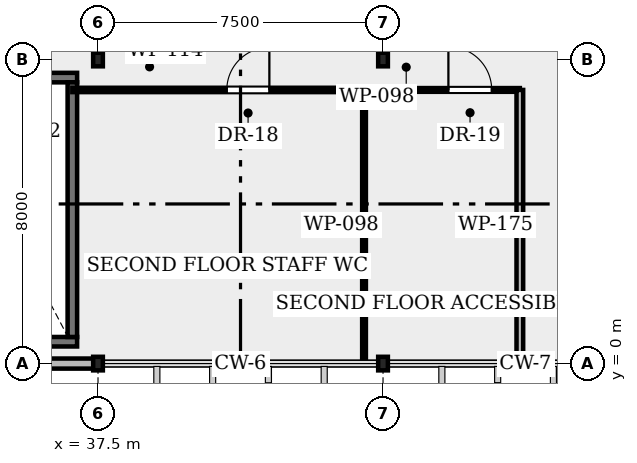
"""IFC4 building model, lengths in metres.
Left out: names, types, materials, properties, quantities, classifications, styles, units other than length and angle.
Written with IfcOpenShell. Run it as: python <this file> out.ifc"""

import sys

from ifc_helpers import new_model, si_unit, direction, frame, frame_2d, origin, origin_2d, place, context, subcontext, project, spatial, rectangle, i_section, extrude, element, fill, save


model = new_model("IFC4")
c1 = context("Model", 3, precision=1e-05, world=origin(), true_north=direction((0.0, 1.0)))
c2 = subcontext(c1, "Body", "Model", "MODEL_VIEW")
j1 = project(units=[si_unit("LENGTHUNIT", "METRE"), si_unit("PLANEANGLEUNIT", "RADIAN")], contexts=[c1])
p1 = place(None, origin())
s1 = spatial("IfcSite", under=j1, at=p1, CompositionType="ELEMENT")
p2 = place(p1, origin())
s2 = spatial("IfcBuilding", under=s1, at=p2, CompositionType="ELEMENT")
p3 = place(p2, frame((0.0, 0.0, 9.0)))
s3 = spatial("IfcBuildingStorey", under=s2, at=p3, CompositionType="ELEMENT", Elevation=9.0)
p4 = place(p3, frame((37.5, 0.0, 0.0), z_axis=(0.0, 0.0, 1.0), x_axis=(1.0, 0.0, 0.0)))
e1 = element("IfcColumn", 1, at=p4, inside=s3, PredefinedType="COLUMN", context=c2, shape_type="SweptSolid", body=[
    extrude(i_section(OverallWidth=0.255, OverallDepth=0.357, WebThickness=0.01, FlangeThickness=0.018, FilletRadius=0.015, at=origin_2d()), origin(), (0.0, 0.0, 1.0), 4.46),
])
p5 = place(p3, frame((37.5, 8.0, 0.0), z_axis=(0.0, 0.0, 1.0), x_axis=(1.0, 0.0, 0.0)))
e2 = element("IfcColumn", 2, at=p5, inside=s3, PredefinedType="COLUMN", context=c2, shape_type="SweptSolid", body=[
    extrude(i_section(OverallWidth=0.255, OverallDepth=0.357, WebThickness=0.01, FlangeThickness=0.018, FilletRadius=0.015, at=origin_2d()), origin(), (0.0, 0.0, 1.0), 4.927),
])
p6 = place(p3, frame((45.0, 0.0, 0.0), z_axis=(0.0, 0.0, 1.0), x_axis=(1.0, 0.0, 0.0)))
e3 = element("IfcColumn", 3, at=p6, inside=s3, PredefinedType="COLUMN", context=c2, shape_type="SweptSolid", body=[
    extrude(i_section(OverallWidth=0.255, OverallDepth=0.357, WebThickness=0.01, FlangeThickness=0.018, FilletRadius=0.015, at=origin_2d()), origin(), (0.0, 0.0, 1.0), 4.46),
])
p7 = place(p3, frame((45.0, 8.0, 0.0), z_axis=(0.0, 0.0, 1.0), x_axis=(1.0, 0.0, 0.0)))
e4 = element("IfcColumn", 4, at=p7, inside=s3, PredefinedType="COLUMN", context=c2, shape_type="SweptSolid", body=[
    extrude(i_section(OverallWidth=0.255, OverallDepth=0.357, WebThickness=0.01, FlangeThickness=0.018, FilletRadius=0.015, at=origin_2d()), origin(), (0.0, 0.0, 1.0), 4.927),
])
p8 = place(p3, frame((30.08, 0.0, 0.0), z_axis=(0.0, 0.0, 1.0), x_axis=(1.0, 0.0, 0.0)))
e5 = element("IfcWall", 5, at=p8, inside=s3, PredefinedType="SOLIDWALL", context=c2, shape_type="SweptSolid", body=[
    extrude(rectangle(XDim=7.34, YDim=0.265, at=frame_2d((3.67, 0.0))), origin(), (0.0, 0.0, 1.0), 4.087),
])
p9 = place(p8, frame((1.2, 0.0, 1.05)))
e6 = element("IfcOpeningElement", 6, at=p9, cuts=e5, PredefinedType="OPENING", context=c2, shape_type="SweptSolid", body=[
    extrude(rectangle(XDim=1.8, YDim=1.1, at=frame_2d((0.9, 0.55))), frame((0.0, 0.142, 0.0), z_axis=(0.0, -1.0, 0.0), x_axis=(1.0, 0.0, 0.0)), (0.0, 0.0, 1.0), 0.285),
])
p10 = place(p8, frame((4.1, 0.0, 1.05)))
e7 = element("IfcOpeningElement", 7, at=p10, cuts=e5, PredefinedType="OPENING", context=c2, shape_type="SweptSolid", body=[
    extrude(rectangle(XDim=1.8, YDim=1.25, at=frame_2d((0.9, 0.625))), frame((0.0, 0.142, 0.0), z_axis=(0.0, -1.0, 0.0), x_axis=(1.0, 0.0, 0.0)), (0.0, 0.0, 1.0), 0.285),
])
p11 = place(p3, frame((30.55, 0.575, 0.0), z_axis=(0.0, 0.0, 1.0), x_axis=(1.0, 0.0, 0.0)))
e8 = element("IfcWall", 8, at=p11, inside=s3, PredefinedType="SHEAR", context=c2, shape_type="SweptSolid", body=[
    extrude(rectangle(XDim=6.4, YDim=0.25, at=frame_2d((3.2, 0.0))), origin(), (0.0, 0.0, 1.0), 3.65),
])
p12 = place(p3, frame((30.55, 7.525, 0.0), z_axis=(0.0, 0.0, 1.0), x_axis=(1.0, 0.0, 0.0)))
e9 = element("IfcWall", 9, at=p12, inside=s3, PredefinedType="SHEAR", context=c2, shape_type="SweptSolid", body=[
    extrude(rectangle(XDim=6.4, YDim=0.25, at=frame_2d((3.2, 0.0))), origin(), (0.0, 0.0, 1.0), 3.65),
])
p13 = place(p12, frame((0.8, 0.0, 0.0)))
e10 = element("IfcOpeningElement", 10, at=p13, cuts=e9, PredefinedType="OPENING", context=c2, shape_type="SweptSolid", body=[
    extrude(rectangle(XDim=1.1, YDim=2.15, at=frame_2d((0.55, 1.075))), frame((0.0, 0.135, 0.0), z_axis=(0.0, -1.0, 0.0), x_axis=(1.0, 0.0, 0.0)), (0.0, 0.0, 1.0), 0.27),
])
p14 = place(p12, frame((3.775, 0.0, 0.0)))
e11 = element("IfcOpeningElement", 11, at=p14, cuts=e9, PredefinedType="OPENING", context=c2, shape_type="SweptSolid", body=[
    extrude(rectangle(XDim=1.25, YDim=2.15, at=frame_2d((0.625, 1.075))), frame((0.0, 0.135, 0.0), z_axis=(0.0, -1.0, 0.0), x_axis=(1.0, 0.0, 0.0)), (0.0, 0.0, 1.0), 0.27),
])
p15 = place(p3, frame((36.825, 0.7, 0.0), z_axis=(0.0, 0.0, 1.0), x_axis=(0.0, 1.0, 0.0)))
e12 = element("IfcWall", 12, at=p15, inside=s3, PredefinedType="SHEAR", context=c2, shape_type="SweptSolid", body=[
    extrude(rectangle(XDim=6.7, YDim=0.25, at=frame_2d((3.35, 0.0))), origin(), (0.0, 0.0, 1.0), 3.65),
])
p16 = place(p3, frame((36.825, 7.2, 0.0), z_axis=(0.0, 0.0, 1.0), x_axis=(1.0, 0.0, 0.0)))
e13 = element("IfcWall", 13, at=p16, inside=s3, PredefinedType="PARTITIONING", context=c2, shape_type="SweptSolid", body=[
    extrude(rectangle(XDim=7.675, YDim=0.114, at=frame_2d((3.837, 0.0))), origin(), (0.0, 0.0, 1.0), 3.7),
])
p17 = place(p16, frame((4.064, 0.0, 0.0)))
e14 = element("IfcOpeningElement", 14, at=p17, cuts=e13, PredefinedType="OPENING", context=c2, shape_type="SweptSolid", body=[
    extrude(rectangle(XDim=1.12, YDim=2.14, at=frame_2d((0.56, 1.07))), frame((0.0, 0.067, 0.0), z_axis=(0.0, -1.0, 0.0), x_axis=(1.0, 0.0, 0.0)), (0.0, 0.0, 1.0), 0.134),
])
p18 = place(p3, frame((44.5, 0.08, 0.0), z_axis=(0.0, 0.0, 1.0), x_axis=(0.0, 1.0, 0.0)))
e15 = element("IfcWall", 15, at=p18, inside=s3, PredefinedType="PARTITIONING", context=c2, shape_type="SweptSolid", body=[
    extrude(rectangle(XDim=7.12, YDim=0.098, at=frame_2d((3.56, 0.0))), origin(), (0.0, 0.0, 1.0), 3.7),
])
p19 = place(p3, frame((44.5, 7.2, 0.0), z_axis=(0.0, 0.0, 1.0), x_axis=(1.0, 0.0, 0.0)))
e16 = element("IfcWall", 16, at=p19, inside=s3, PredefinedType="PARTITIONING", context=c2, shape_type="SweptSolid", body=[
    extrude(rectangle(XDim=4.1, YDim=0.098, at=frame_2d((2.05, 0.0))), origin(), (0.0, 0.0, 1.0), 3.7),
])
p20 = place(p19, frame((2.22, 0.0, 0.0)))
e17 = element("IfcOpeningElement", 17, at=p20, cuts=e16, PredefinedType="OPENING", context=c2, shape_type="SweptSolid", body=[
    extrude(rectangle(XDim=1.14, YDim=2.16, at=frame_2d((0.57, 1.08))), frame((0.0, 0.059, 0.0), z_axis=(0.0, -1.0, 0.0), x_axis=(1.0, 0.0, 0.0)), (0.0, 0.0, 1.0), 0.118),
])
p21 = place(p3, frame((48.6, 0.08, 0.0), z_axis=(0.0, 0.0, 1.0), x_axis=(0.0, 1.0, 0.0)))
e18 = element("IfcWall", 18, at=p21, inside=s3, PredefinedType="PARTITIONING", context=c2, shape_type="SweptSolid", body=[
    extrude(rectangle(XDim=7.12, YDim=0.175, at=frame_2d((3.56, 0.0))), origin(), (0.0, 0.0, 1.0), 3.7),
])
p22 = place(p17, origin())
e19 = element("IfcDoor", 19, at=p22, inside=s3, OperationType="SINGLE_SWING_RIGHT", PredefinedType="DOOR", context=c2, shape_type="SweptSolid", body=[
    extrude(rectangle(XDim=1.12, YDim=2.14, at=frame_2d((0.56, 1.07))), frame((0.0, 0.025, 0.0), z_axis=(0.0, -1.0, 0.0), x_axis=(1.0, 0.0, 0.0)), (0.0, 0.0, 1.0), 0.05),
])
fill(e14, e19)
p23 = place(p20, origin())
e20 = element("IfcDoor", 20, at=p23, inside=s3, OperationType="SINGLE_SWING_LEFT", PredefinedType="DOOR", context=c2, shape_type="SweptSolid", body=[
    extrude(rectangle(XDim=1.14, YDim=2.16, at=frame_2d((0.57, 1.08))), frame((0.0, 0.025, 0.0), z_axis=(0.0, -1.0, 0.0), x_axis=(1.0, 0.0, 0.0)), (0.0, 0.0, 1.0), 0.05),
])
fill(e17, e20)
save(model, sys.argv[1])
